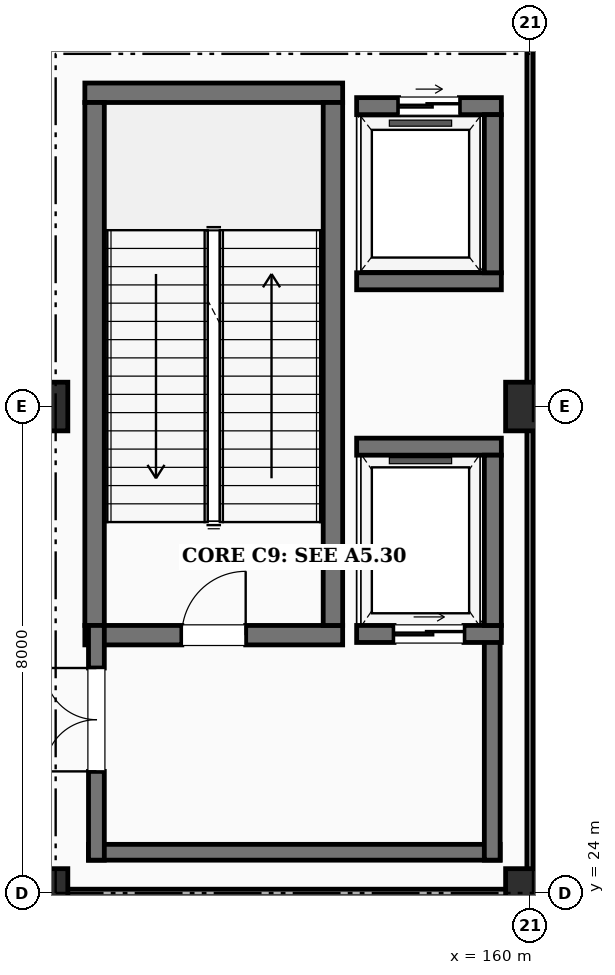
"""IFC4 building model, lengths in metres.
Left out: names, types, materials, properties, quantities, classifications, styles, units other than length and angle.
Written with IfcOpenShell. Run it as: python <this file> out.ifc"""

import sys

from ifc_helpers import new_model, si_unit, direction, frame, frame_2d, origin, origin_2d, place, context, subcontext, project, spatial, rectangle, extrude, element, fill, save


model = new_model("IFC4")
c1 = context("Model", 3, precision=1e-05, world=origin(), true_north=direction((0.0, 1.0)))
c2 = subcontext(c1, "Body", "Model", "MODEL_VIEW")
j1 = project(units=[si_unit("LENGTHUNIT", "METRE"), si_unit("PLANEANGLEUNIT", "RADIAN")], contexts=[c1])
p1 = place(None, origin())
s1 = spatial("IfcSite", under=j1, at=p1, CompositionType="ELEMENT")
p2 = place(p1, origin())
s2 = spatial("IfcBuilding", under=s1, at=p2, CompositionType="ELEMENT")
p3 = place(p2, origin())
s3 = spatial("IfcBuildingStorey", under=s2, at=p3, CompositionType="ELEMENT", Elevation=0.0)
for number, where, z_axis, x_axis in (
    (1, (152.0, 24.0, 0.0), (0.0, 0.0, 1.0), (1.0, 0.0, 0.0)),
    (2, (152.0, 32.0, 0.0), (0.0, 0.0, 1.0), (1.0, 0.0, 0.0)),
    (3, (160.0, 24.0, 0.0), (0.0, 0.0, 1.0), (1.0, 0.0, 0.0)),
    (4, (160.0, 32.0, 0.0), (0.0, 0.0, 1.0), (1.0, 0.0, 0.0)),
):
    element("IfcColumn", number, at=place(p3, frame(where, z_axis=z_axis, x_axis=x_axis)), inside=s3, PredefinedType="COLUMN", context=c2, shape_type="SweptSolid", body=[
        extrude(rectangle(XDim=0.8, YDim=0.8, at=origin_2d()), origin(), (0.0, 0.0, 1.0), 5.4),
    ])
p4 = place(p3, frame((152.68, 28.24, 0.0), z_axis=(0.0, 0.0, 1.0), x_axis=(1.0, 0.0, 0.0)))
e5 = element("IfcWall", 5, at=p4, inside=s3, PredefinedType="SHEAR", context=c2, shape_type="SweptSolid", body=[
    extrude(rectangle(XDim=4.24, YDim=0.32, at=frame_2d((2.12, 0.0))), origin(), (0.0, 0.0, 1.0), 5.4),
])
p5 = place(p4, frame((1.595, 0.0, 0.0)))
e6 = element("IfcOpeningElement", 6, at=p5, cuts=e5, PredefinedType="OPENING", context=c2, shape_type="SweptSolid", body=[
    extrude(rectangle(XDim=1.05, YDim=2.15, at=frame_2d((0.525, 1.075))), frame((0.0, 0.17, 0.0), z_axis=(0.0, -1.0, 0.0), x_axis=(1.0, 0.0, 0.0)), (0.0, 0.0, 1.0), 0.34),
])
p6 = place(p3, frame((152.68, 37.16, 0.0), z_axis=(0.0, 0.0, 1.0), x_axis=(1.0, 0.0, 0.0)))
e7 = element("IfcWall", 7, at=p6, inside=s3, PredefinedType="SHEAR", context=c2, shape_type="SweptSolid", body=[
    extrude(rectangle(XDim=4.24, YDim=0.32, at=frame_2d((2.12, 0.0))), origin(), (0.0, 0.0, 1.0), 5.4),
])
for number, where, z_axis, x_axis in (
    (8, (152.84, 28.4, 0.0), (0.0, 0.0, 1.0), (0.0, 1.0, 0.0)),
    (9, (156.76, 28.4, 0.0), (0.0, 0.0, 1.0), (0.0, 1.0, 0.0)),
):
    element("IfcWall", number, at=place(p3, frame(where, z_axis=z_axis, x_axis=x_axis)), inside=s3, PredefinedType="SHEAR", context=c2, shape_type="SweptSolid", body=[
        extrude(rectangle(XDim=8.6, YDim=0.32, at=frame_2d((4.3, 0.0))), origin(), (0.0, 0.0, 1.0), 5.4),
    ])
p7 = place(p3, frame((159.51, 24.67, 0.0), z_axis=(0.0, 0.0, 1.0), x_axis=(-1.0, 0.0, 0.0)))
e10 = element("IfcWall", 10, at=p7, inside=s3, PredefinedType="SHEAR", context=c2, shape_type="SweptSolid", body=[
    extrude(rectangle(XDim=6.77, YDim=0.26, at=frame_2d((3.385, 0.0))), origin(), (0.0, 0.0, 1.0), 5.4),
])
p8 = place(p3, frame((152.87, 24.54, 0.0), z_axis=(0.0, 0.0, 1.0), x_axis=(0.0, 1.0, 0.0)))
e11 = element("IfcWall", 11, at=p8, inside=s3, PredefinedType="SHEAR", context=c2, shape_type="SweptSolid", body=[
    extrude(rectangle(XDim=3.86, YDim=0.26, at=frame_2d((1.93, 0.0))), origin(), (0.0, 0.0, 1.0), 5.4),
])
p9 = place(p8, frame((1.46, 0.0, 0.0)))
e12 = element("IfcOpeningElement", 12, at=p9, cuts=e11, PredefinedType="OPENING", context=c2, shape_type="SweptSolid", body=[
    extrude(rectangle(XDim=1.7, YDim=2.2, at=frame_2d((0.85, 1.1))), frame((0.0, 0.14, 0.0), z_axis=(0.0, -1.0, 0.0), x_axis=(1.0, 0.0, 0.0)), (0.0, 0.0, 1.0), 0.28),
])
p10 = place(p3, frame((159.38, 24.54, 0.0), z_axis=(0.0, 0.0, 1.0), x_axis=(0.0, 1.0, 0.0)))
e13 = element("IfcWall", 13, at=p10, inside=s3, PredefinedType="SHEAR", context=c2, shape_type="SweptSolid", body=[
    extrude(rectangle(XDim=3.86, YDim=0.26, at=frame_2d((1.93, 0.0))), origin(), (0.0, 0.0, 1.0), 5.4),
])
p11 = place(p3, frame((157.15, 28.26, 0.0), z_axis=(0.0, 0.0, 1.0), x_axis=(1.0, 0.0, 0.0)))
e14 = element("IfcWall", 14, at=p11, inside=s3, PredefinedType="SHEAR", context=c2, shape_type="SweptSolid", body=[
    extrude(rectangle(XDim=2.38, YDim=0.28, at=frame_2d((1.19, 0.0))), origin(), (0.0, 0.0, 1.0), 5.4),
])
p12 = place(p11, frame((0.615, 0.0, 0.0)))
e15 = element("IfcOpeningElement", 15, at=p12, cuts=e14, PredefinedType="OPENING", context=c2, shape_type="SweptSolid", body=[
    extrude(rectangle(XDim=1.15, YDim=2.2, at=frame_2d((0.575, 1.1))), frame((0.0, 0.15, 0.0), z_axis=(0.0, -1.0, 0.0), x_axis=(1.0, 0.0, 0.0)), (0.0, 0.0, 1.0), 0.3),
])
p13 = place(p3, frame((157.15, 31.34, 0.0), z_axis=(0.0, 0.0, 1.0), x_axis=(1.0, 0.0, 0.0)))
e16 = element("IfcWall", 16, at=p13, inside=s3, PredefinedType="SHEAR", context=c2, shape_type="SweptSolid", body=[
    extrude(rectangle(XDim=2.38, YDim=0.28, at=frame_2d((1.19, 0.0))), origin(), (0.0, 0.0, 1.0), 5.4),
])
p14 = place(p3, frame((159.39, 28.4, 0.0), z_axis=(0.0, 0.0, 1.0), x_axis=(0.0, 1.0, 0.0)))
e17 = element("IfcWall", 17, at=p14, inside=s3, PredefinedType="SHEAR", context=c2, shape_type="SweptSolid", body=[
    extrude(rectangle(XDim=2.8, YDim=0.28, at=frame_2d((1.4, 0.0))), origin(), (0.0, 0.0, 1.0), 5.4),
])
p15 = place(p3, frame((157.15, 34.06, 0.0), z_axis=(0.0, 0.0, 1.0), x_axis=(1.0, 0.0, 0.0)))
e18 = element("IfcWall", 18, at=p15, inside=s3, PredefinedType="SHEAR", context=c2, shape_type="SweptSolid", body=[
    extrude(rectangle(XDim=2.38, YDim=0.28, at=frame_2d((1.19, 0.0))), origin(), (0.0, 0.0, 1.0), 5.4),
])
p16 = place(p3, frame((157.15, 36.94, 0.0), z_axis=(0.0, 0.0, 1.0), x_axis=(1.0, 0.0, 0.0)))
e19 = element("IfcWall", 19, at=p16, inside=s3, PredefinedType="SHEAR", context=c2, shape_type="SweptSolid", body=[
    extrude(rectangle(XDim=2.38, YDim=0.28, at=frame_2d((1.19, 0.0))), origin(), (0.0, 0.0, 1.0), 5.4),
])
p17 = place(p16, frame((0.69, 0.0, 0.0)))
e20 = element("IfcOpeningElement", 20, at=p17, cuts=e19, PredefinedType="OPENING", context=c2, shape_type="SweptSolid", body=[
    extrude(rectangle(XDim=1.0, YDim=2.15, at=frame_2d((0.5, 1.075))), frame((0.0, 0.15, 0.0), z_axis=(0.0, -1.0, 0.0), x_axis=(1.0, 0.0, 0.0)), (0.0, 0.0, 1.0), 0.3),
])
p18 = place(p3, frame((159.39, 34.2, 0.0), z_axis=(0.0, 0.0, 1.0), x_axis=(0.0, 1.0, 0.0)))
e21 = element("IfcWall", 21, at=p18, inside=s3, PredefinedType="SHEAR", context=c2, shape_type="SweptSolid", body=[
    extrude(rectangle(XDim=2.6, YDim=0.28, at=frame_2d((1.3, 0.0))), origin(), (0.0, 0.0, 1.0), 5.4),
])
p19 = place(p3, frame((152.22, 24.0, 0.0), z_axis=(0.0, 0.0, 1.0), x_axis=(1.0, 0.0, 0.0)))
e22 = element("IfcWall", 22, at=p19, inside=s3, PredefinedType="PARTITIONING", context=c2, shape_type="SweptSolid", body=[
    extrude(rectangle(XDim=7.76, YDim=0.125, at=frame_2d((3.88, 0.0))), origin(), (0.0, 0.0, 1.0), 4.27),
])
p20 = place(p3, frame((160.02, 24.0, 0.0), z_axis=(0.0, 0.0, 1.0), x_axis=(1.0, 0.0, 0.0)))
e23 = element("IfcWall", 23, at=p20, inside=s3, PredefinedType="PARTITIONING", context=c2, shape_type="SweptSolid", body=[
    extrude(rectangle(XDim=7.96, YDim=0.115, at=frame_2d((3.98, 0.0))), origin(), (0.0, 0.0, 1.0), 4.27),
])
p21 = place(p20, frame((3.355, 0.0, 0.0)))
e24 = element("IfcOpeningElement", 24, at=p21, cuts=e23, PredefinedType="OPENING", context=c2, shape_type="SweptSolid", body=[
    extrude(rectangle(XDim=1.25, YDim=2.15, at=frame_2d((0.625, 1.075))), frame((0.0, 0.067, 0.0), z_axis=(0.0, -1.0, 0.0), x_axis=(1.0, 0.0, 0.0)), (0.0, 0.0, 1.0), 0.135),
])
p22 = place(p3, frame((160.0, 24.02, 0.0), z_axis=(0.0, 0.0, 1.0), x_axis=(0.0, 1.0, 0.0)))
e25 = element("IfcWall", 25, at=p22, inside=s3, PredefinedType="PARTITIONING", context=c2, shape_type="SweptSolid", body=[
    extrude(rectangle(XDim=19.16, YDim=0.1, at=frame_2d((9.58, 0.0))), origin(), (0.0, 0.0, 1.0), 4.27),
])
p23 = place(p5, origin())
e26 = element("IfcDoor", 26, at=p23, inside=s3, OperationType="SINGLE_SWING_RIGHT", PredefinedType="DOOR", context=c2, shape_type="SweptSolid", body=[
    extrude(rectangle(XDim=1.05, YDim=2.15, at=frame_2d((0.525, 1.075))), frame((0.0, 0.025, 0.0), z_axis=(0.0, -1.0, 0.0), x_axis=(1.0, 0.0, 0.0)), (0.0, 0.0, 1.0), 0.05),
])
fill(e6, e26)
p24 = place(p9, origin())
e27 = element("IfcDoor", 27, at=p24, inside=s3, OperationType="DOUBLE_DOOR_SINGLE_SWING", PredefinedType="DOOR", context=c2, shape_type="SweptSolid", body=[
    extrude(rectangle(XDim=1.7, YDim=2.2, at=frame_2d((0.85, 1.1))), frame((0.0, 0.025, 0.0), z_axis=(0.0, -1.0, 0.0), x_axis=(1.0, 0.0, 0.0)), (0.0, 0.0, 1.0), 0.05),
])
fill(e12, e27)
p25 = place(p12, origin())
e28 = element("IfcDoor", 28, at=p25, inside=s3, OperationType="SLIDING_TO_LEFT", PredefinedType="DOOR", context=c2, shape_type="SweptSolid", body=[
    extrude(rectangle(XDim=1.15, YDim=2.2, at=frame_2d((0.575, 1.1))), frame((0.0, 0.025, 0.0), z_axis=(0.0, -1.0, 0.0), x_axis=(1.0, 0.0, 0.0)), (0.0, 0.0, 1.0), 0.05),
])
fill(e15, e28)
p26 = place(p17, origin())
e29 = element("IfcDoor", 29, at=p26, inside=s3, OperationType="SLIDING_TO_LEFT", PredefinedType="DOOR", context=c2, shape_type="SweptSolid", body=[
    extrude(rectangle(XDim=1.0, YDim=2.15, at=frame_2d((0.5, 1.075))), frame((0.0, 0.025, 0.0), z_axis=(0.0, -1.0, 0.0), x_axis=(1.0, 0.0, 0.0)), (0.0, 0.0, 1.0), 0.05),
])
fill(e20, e29)
save(model, sys.argv[1])
